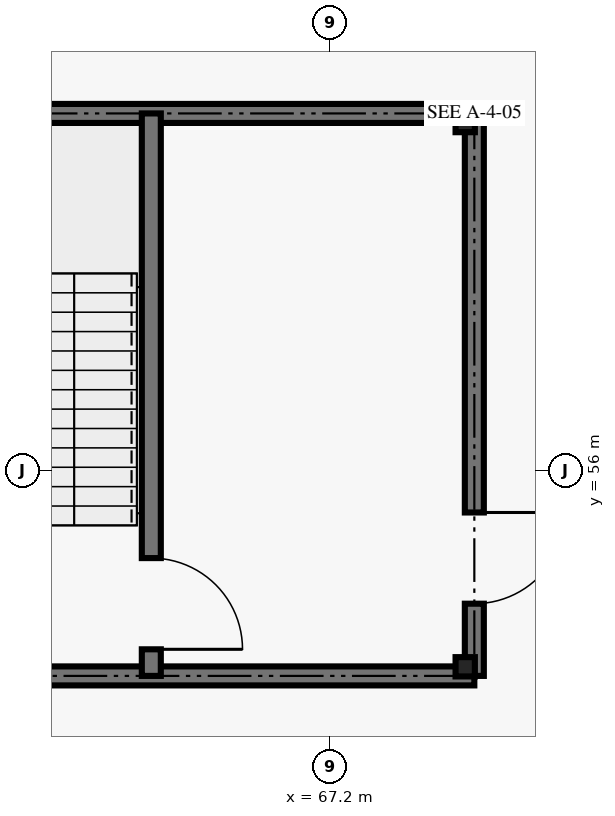
"""IFC4 building model, lengths in metres.
Left out: names, types, materials, properties, quantities, classifications, styles, units other than length and angle.
Written with IfcOpenShell. Run it as: python <this file> out.ifc"""

import sys

from ifc_helpers import new_model, si_unit, direction, frame, frame_2d, origin, origin_2d, place, context, subcontext, project, spatial, rectangle, i_section, extrude, element, fill, save


model = new_model("IFC4")
c1 = context("Model", 3, precision=1e-05, world=origin(), true_north=direction((0.0, 1.0)))
c2 = subcontext(c1, "Body", "Model", "MODEL_VIEW")
j1 = project(units=[si_unit("LENGTHUNIT", "METRE"), si_unit("PLANEANGLEUNIT", "RADIAN")], contexts=[c1])
p1 = place(None, origin())
s1 = spatial("IfcSite", under=j1, at=p1, CompositionType="ELEMENT")
p2 = place(p1, origin())
s2 = spatial("IfcBuilding", under=s1, at=p2, CompositionType="ELEMENT")
p3 = place(p2, frame((0.0, 0.0, 10.2)))
s3 = spatial("IfcBuildingStorey", under=s2, at=p3, CompositionType="ELEMENT", Elevation=10.2)
for number, where, z_axis, x_axis in (
    (1, (68.98, 53.42, 0.0), (0.0, 0.0, 1.0), (1.0, 0.0, 0.0)),
    (2, (68.98, 60.58, 0.0), (0.0, 0.0, 1.0), (1.0, 0.0, 0.0)),
):
    element("IfcColumn", number, at=place(p3, frame(where, z_axis=z_axis, x_axis=x_axis)), inside=s3, PredefinedType="COLUMN", context=c2, shape_type="SweptSolid", body=[
        extrude(i_section(OverallWidth=0.254, OverallDepth=0.254, WebThickness=0.009, FlangeThickness=0.014, FilletRadius=0.013, at=origin_2d()), origin(), (0.0, 0.0, 1.0), 4.8),
    ])
for number, where, z_axis, x_axis in (
    (3, (59.9, 60.7, 0.0), (0.0, 0.0, 1.0), (1.0, 0.0, 0.0)),
    (4, (69.1, 53.3, 0.0), (0.0, 0.0, 1.0), (-1.0, 0.0, 0.0)),
):
    element("IfcWall", number, at=place(p3, frame(where, z_axis=z_axis, x_axis=x_axis)), inside=s3, PredefinedType="SHEAR", context=c2, shape_type="SweptSolid", body=[
        extrude(rectangle(XDim=9.2, YDim=0.25, at=frame_2d((4.6, 0.0))), origin(), (0.0, 0.0, 1.0), 4.56),
    ])
p4 = place(p3, frame((69.1, 60.7, 0.0), z_axis=(0.0, 0.0, 1.0), x_axis=(0.0, -1.0, 0.0)))
e5 = element("IfcWall", 5, at=p4, inside=s3, PredefinedType="SHEAR", context=c2, shape_type="SweptSolid", body=[
    extrude(rectangle(XDim=7.4, YDim=0.25, at=frame_2d((3.7, 0.0))), origin(), (0.0, 0.0, 1.0), 4.56),
])
p5 = place(p4, frame((5.25, 0.0, 0.0)))
e6 = element("IfcOpeningElement", 6, at=p5, cuts=e5, PredefinedType="OPENING", context=c2, shape_type="SweptSolid", body=[
    extrude(rectangle(XDim=1.2, YDim=2.2, at=frame_2d((0.6, 1.1))), frame((0.0, 0.135, 0.0), z_axis=(0.0, -1.0, 0.0), x_axis=(1.0, 0.0, 0.0)), (0.0, 0.0, 1.0), 0.27),
])
p6 = place(p3, frame((64.85, 60.7, 0.0), z_axis=(0.0, 0.0, 1.0), x_axis=(0.0, -1.0, 0.0)))
e7 = element("IfcWall", 7, at=p6, inside=s3, PredefinedType="SHEAR", context=c2, shape_type="SweptSolid", body=[
    extrude(rectangle(XDim=7.4, YDim=0.25, at=frame_2d((3.7, 0.0))), origin(), (0.0, 0.0, 1.0), 4.56),
])
p7 = place(p6, frame((5.85, 0.0, 0.0)))
e8 = element("IfcOpeningElement", 8, at=p7, cuts=e7, PredefinedType="OPENING", context=c2, shape_type="SweptSolid", body=[
    extrude(rectangle(XDim=1.2, YDim=2.2, at=frame_2d((0.6, 1.1))), frame((0.0, 0.135, 0.0), z_axis=(0.0, -1.0, 0.0), x_axis=(1.0, 0.0, 0.0)), (0.0, 0.0, 1.0), 0.27),
])
p8 = place(p5, origin())
e9 = element("IfcDoor", 9, at=p8, inside=s3, OperationType="SINGLE_SWING_LEFT", PredefinedType="DOOR", context=c2, shape_type="SweptSolid", body=[
    extrude(rectangle(XDim=1.2, YDim=2.2, at=frame_2d((0.6, 1.1))), frame((0.0, 0.025, 0.0), z_axis=(0.0, -1.0, 0.0), x_axis=(1.0, 0.0, 0.0)), (0.0, 0.0, 1.0), 0.05),
])
fill(e6, e9)
p9 = place(p7, origin())
e10 = element("IfcDoor", 10, at=p9, inside=s3, OperationType="SINGLE_SWING_RIGHT", PredefinedType="DOOR", context=c2, shape_type="SweptSolid", body=[
    extrude(rectangle(XDim=1.2, YDim=2.2, at=frame_2d((0.6, 1.1))), frame((0.0, 0.025, 0.0), z_axis=(0.0, -1.0, 0.0), x_axis=(1.0, 0.0, 0.0)), (0.0, 0.0, 1.0), 0.05),
])
fill(e8, e10)
save(model, sys.argv[1])
